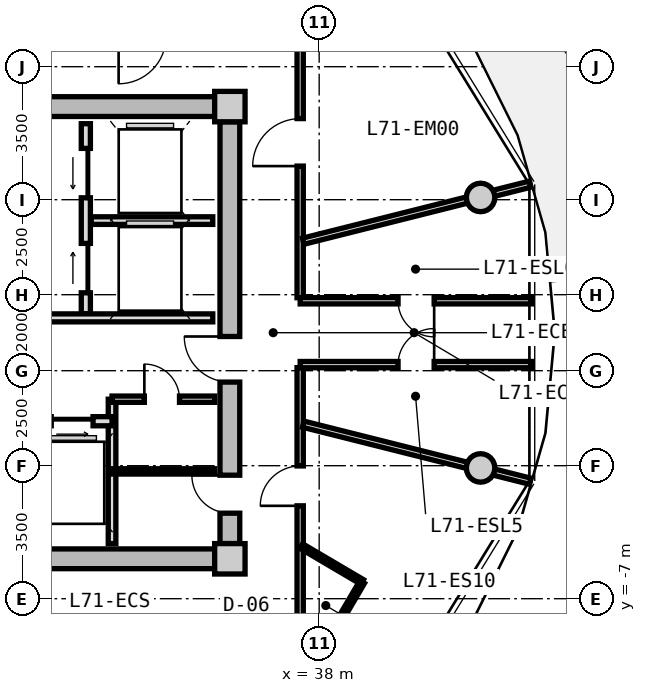
"""IFC4 building model, lengths in metres.
Left out: names, types, materials, properties, quantities, classifications, styles, units other than length and angle.
Written with IfcOpenShell. Run it as: python <this file> out.ifc"""

import sys

from ifc_helpers import new_model, si_unit, direction, frame, frame_2d, origin, origin_2d, place, context, subcontext, project, spatial, rectangle, circle, extrude, source, transform, mapped, element, fill, save


model = new_model("IFC4")
c1 = context("Model", 3, precision=1e-05, world=origin(), true_north=direction((0.0, 1.0)))
c2 = subcontext(c1, "Body", "Model", "MODEL_VIEW")
j1 = project(units=[si_unit("LENGTHUNIT", "METRE"), si_unit("PLANEANGLEUNIT", "RADIAN")], contexts=[c1])
p1 = place(None, origin())
s1 = spatial("IfcSite", under=j1, at=p1, CompositionType="ELEMENT")
p2 = place(p1, origin())
s2 = spatial("IfcBuilding", under=s1, at=p2, CompositionType="ELEMENT")
p3 = place(p2, frame((0.0, 0.0, 229.15)))
s3 = spatial("IfcBuildingStorey", under=s2, at=p3, CompositionType="ELEMENT", Elevation=229.15)
m1 = source(origin(), c2, "Body", "SweptSolid", [
    extrude(rectangle(XDim=0.8, YDim=0.8, at=origin_2d()), origin(), (0.0, 0.0, 1.0), 3.05),
])
for number, where, z_axis, x_axis in (
    (1, (35.65, -5.95, 0.0), (0.0, 0.0, 1.0), (1.0, 0.0, 0.0)),
    (2, (35.65, 5.95, 0.0), (0.0, 0.0, 1.0), (1.0, 0.0, 0.0)),
):
    element("IfcColumn", number, at=place(p3, frame(where, z_axis=z_axis, x_axis=x_axis)), inside=s3, PredefinedType="COLUMN", context=c2, shape_type="MappedRepresentation", body=[
        mapped(m1, transform((0.0, 0.0, 0.0), x_axis=(1.0, 0.0, 0.0), y_axis=(0.0, 1.0, 0.0), z_axis=(0.0, 0.0, 1.0), scale=1.0)),
    ])
m2 = source(origin(), c2, "Body", "SweptSolid", [
    extrude(rectangle(XDim=14.5, YDim=0.52, at=frame_2d((7.25, 0.0))), origin(), (0.0, 0.0, 1.0), 2.81),
])
for number, where, z_axis, x_axis in (
    (3, (20.75, 5.95, 0.0), (0.0, 0.0, 1.0), (1.0, 0.0, 0.0)),
    (4, (35.25, -5.95, 0.0), (0.0, 0.0, 1.0), (-1.0, 0.0, 0.0)),
):
    element("IfcWall", number, at=place(p3, frame(where, z_axis=z_axis, x_axis=x_axis)), inside=s3, PredefinedType="SHEAR", context=c2, shape_type="MappedRepresentation", body=[
        mapped(m2, transform((0.0, 0.0, 0.0), x_axis=(1.0, 0.0, 0.0), y_axis=(0.0, 1.0, 0.0), z_axis=(0.0, 0.0, 1.0), scale=1.0)),
    ])
m3 = source(origin(), c2, "Body", "SweptSolid", [
    extrude(rectangle(XDim=11.1, YDim=0.52, at=frame_2d((5.55, 0.0))), origin(), (0.0, 0.0, 1.0), 2.81),
])
p4 = place(p3, frame((35.65, 5.55, 0.0), z_axis=(0.0, 0.0, 1.0), x_axis=(0.0, -1.0, 0.0)))
e5 = element("IfcWall", 5, at=p4, inside=s3, PredefinedType="SHEAR", context=c2, shape_type="MappedRepresentation", body=[
    mapped(m3, transform((0.0, 0.0, 0.0), x_axis=(1.0, 0.0, 0.0), y_axis=(0.0, 1.0, 0.0), z_axis=(0.0, 0.0, 1.0), scale=1.0)),
])
p5 = place(p4, frame((5.65, 0.0, 0.0)))
e6 = element("IfcOpeningElement", 6, at=p5, cuts=e5, PredefinedType="OPENING", context=c2, shape_type="SweptSolid", body=[
    extrude(rectangle(XDim=1.2, YDim=2.15, at=frame_2d((0.6, 1.075))), frame((0.0, 0.27, 0.0), z_axis=(0.0, -1.0, 0.0), x_axis=(1.0, 0.0, 0.0)), (0.0, 0.0, 1.0), 0.54),
])
p6 = place(p4, frame((9.3, 0.0, 0.0)))
e7 = element("IfcOpeningElement", 7, at=p6, cuts=e5, PredefinedType="OPENING", context=c2, shape_type="SweptSolid", body=[
    extrude(rectangle(XDim=1.0, YDim=2.1, at=frame_2d((0.5, 1.05))), frame((0.0, 0.27, 0.0), z_axis=(0.0, -1.0, 0.0), x_axis=(1.0, 0.0, 0.0)), (0.0, 0.0, 1.0), 0.54),
])
m4 = source(origin(), c2, "Body", "SweptSolid", [
    extrude(circle(Radius=0.375, at=origin_2d()), origin(), (0.0, 0.0, 1.0), 3.05),
])
for number, where, z_axis, x_axis in (
    (8, (42.247, 3.559, 0.0), (0.0, 0.0, 1.0), (1.0, 0.0, 0.0)),
    (9, (42.247, -3.559, 0.0), (0.0, 0.0, 1.0), (1.0, 0.0, 0.0)),
):
    element("IfcColumn", number, at=place(p3, frame(where, z_axis=z_axis, x_axis=x_axis)), inside=s3, PredefinedType="COLUMN", context=c2, shape_type="MappedRepresentation", body=[
        mapped(m4, transform((0.0, 0.0, 0.0), x_axis=(1.0, 0.0, 0.0), y_axis=(0.0, 1.0, 0.0), z_axis=(0.0, 0.0, 1.0), scale=1.0)),
    ])
m5 = source(origin(), c2, "Body", "SweptSolid", [
    extrude(rectangle(XDim=5.0, YDim=0.24, at=frame_2d((2.5, 0.0))), origin(), (0.0, 0.0, 1.0), 2.795),
])
p7 = place(p3, frame((31.86, 0.5, 0.0), z_axis=(0.0, 0.0, 1.0), x_axis=(0.0, 1.0, 0.0)))
e10 = element("IfcWall", 10, at=p7, inside=s3, PredefinedType="PARTITIONING", context=c2, shape_type="MappedRepresentation", body=[
    mapped(m5, transform((0.0, 0.0, 0.0), x_axis=(1.0, 0.0, 0.0), y_axis=(0.0, 1.0, 0.0), z_axis=(0.0, 0.0, 1.0), scale=1.0)),
])
p8 = place(p7, frame((3.05, 0.0, 0.0)))
e11 = element("IfcOpeningElement", 11, at=p8, cuts=e10, PredefinedType="OPENING", context=c2, shape_type="SweptSolid", body=[
    extrude(rectangle(XDim=1.3, YDim=2.2, at=frame_2d((0.65, 1.1))), frame((0.0, 0.13, 0.0), z_axis=(0.0, -1.0, 0.0), x_axis=(1.0, 0.0, 0.0)), (0.0, 0.0, 1.0), 0.26),
])
p9 = place(p7, frame((0.55, 0.0, 0.0)))
e12 = element("IfcOpeningElement", 12, at=p9, cuts=e10, PredefinedType="OPENING", context=c2, shape_type="SweptSolid", body=[
    extrude(rectangle(XDim=1.3, YDim=2.2, at=frame_2d((0.65, 1.1))), frame((0.0, 0.13, 0.0), z_axis=(0.0, -1.0, 0.0), x_axis=(1.0, 0.0, 0.0)), (0.0, 0.0, 1.0), 0.26),
])
m6 = source(origin(), c2, "Body", "SweptSolid", [
    extrude(rectangle(XDim=3.2, YDim=0.2, at=frame_2d((1.6, 0.0))), origin(), (0.0, 0.0, 1.0), 2.795),
])
p10 = place(p3, frame((32.0, 2.95, 0.0), z_axis=(0.0, 0.0, 1.0), x_axis=(1.0, 0.0, 0.0)))
e13 = element("IfcWall", 13, at=p10, inside=s3, PredefinedType="PARTITIONING", context=c2, shape_type="MappedRepresentation", body=[
    mapped(m6, transform((0.0, 0.0, 0.0), x_axis=(1.0, 0.0, 0.0), y_axis=(0.0, 1.0, 0.0), z_axis=(0.0, 0.0, 1.0), scale=1.0)),
])
m7 = source(origin(), c2, "Body", "SweptSolid", [
    extrude(rectangle(XDim=6.66, YDim=0.21, at=frame_2d((3.33, 0.0))), origin(), (0.0, 0.0, 1.0), 2.795),
])
p11 = place(p3, frame((28.54, 0.39, 0.0), z_axis=(0.0, 0.0, 1.0), x_axis=(1.0, 0.0, 0.0)))
e14 = element("IfcWall", 14, at=p11, inside=s3, PredefinedType="PARTITIONING", context=c2, shape_type="MappedRepresentation", body=[
    mapped(m7, transform((0.0, 0.0, 0.0), x_axis=(1.0, 0.0, 0.0), y_axis=(0.0, 1.0, 0.0), z_axis=(0.0, 0.0, 1.0), scale=1.0)),
])
p12 = place(p11, frame((1.0, 0.0, 0.0)))
e15 = element("IfcOpeningElement", 15, at=p12, cuts=e14, PredefinedType="OPENING", context=c2, shape_type="SweptSolid", body=[
    extrude(rectangle(XDim=1.2, YDim=2.15, at=frame_2d((0.6, 1.075))), frame((0.0, 0.115, 0.0), z_axis=(0.0, -1.0, 0.0), x_axis=(1.0, 0.0, 0.0)), (0.0, 0.0, 1.0), 0.23),
])
m8 = source(origin(), c2, "Body", "SweptSolid", [
    extrude(rectangle(XDim=3.8, YDim=0.2, at=frame_2d((1.9, 0.0))), origin(), (0.0, 0.0, 1.0), 2.795),
])
p13 = place(p3, frame((32.55, -5.55, 0.0), z_axis=(0.0, 0.0, 1.0), x_axis=(0.0, 1.0, 0.0)))
e16 = element("IfcWall", 16, at=p13, inside=s3, PredefinedType="PARTITIONING", context=c2, shape_type="MappedRepresentation", body=[
    mapped(m8, transform((0.0, 0.0, 0.0), x_axis=(1.0, 0.0, 0.0), y_axis=(0.0, 1.0, 0.0), z_axis=(0.0, 0.0, 1.0), scale=1.0)),
])
m9 = source(origin(), c2, "Body", "SweptSolid", [
    extrude(rectangle(XDim=2.05, YDim=0.24, at=frame_2d((1.025, 0.0))), origin(), (0.0, 0.0, 1.0), 2.795),
])
p14 = place(p3, frame((30.5, -2.33, 0.0), z_axis=(0.0, 0.0, 1.0), x_axis=(1.0, 0.0, 0.0)))
e17 = element("IfcWall", 17, at=p14, inside=s3, PredefinedType="PARTITIONING", context=c2, shape_type="MappedRepresentation", body=[
    mapped(m9, transform((0.0, 0.0, 0.0), x_axis=(1.0, 0.0, 0.0), y_axis=(0.0, 1.0, 0.0), z_axis=(0.0, 0.0, 1.0), scale=1.0)),
])
p15 = place(p14, frame((0.45, 0.0, 0.0)))
e18 = element("IfcOpeningElement", 18, at=p15, cuts=e17, PredefinedType="OPENING", context=c2, shape_type="SweptSolid", body=[
    extrude(rectangle(XDim=1.1, YDim=2.2, at=frame_2d((0.55, 1.1))), frame((0.0, 0.13, 0.0), z_axis=(0.0, -1.0, 0.0), x_axis=(1.0, 0.0, 0.0)), (0.0, 0.0, 1.0), 0.26),
])
m10 = source(origin(), c2, "Body", "SweptSolid", [
    extrude(rectangle(XDim=2.7, YDim=0.165, at=frame_2d((1.35, 0.0))), origin(), (0.0, 0.0, 1.0), 2.795),
])
p16 = place(p3, frame((32.55, -1.75, 0.0), z_axis=(0.0, 0.0, 1.0), x_axis=(1.0, 0.0, 0.0)))
e19 = element("IfcWall", 19, at=p16, inside=s3, PredefinedType="PARTITIONING", context=c2, shape_type="MappedRepresentation", body=[
    mapped(m10, transform((0.0, 0.0, 0.0), x_axis=(1.0, 0.0, 0.0), y_axis=(0.0, 1.0, 0.0), z_axis=(0.0, 0.0, 1.0), scale=1.0)),
])
p17 = place(p16, frame((0.85, 0.0, 0.0)))
e20 = element("IfcOpeningElement", 20, at=p17, cuts=e19, PredefinedType="OPENING", context=c2, shape_type="SweptSolid", body=[
    extrude(rectangle(XDim=0.925, YDim=2.1, at=frame_2d((0.462, 1.05))), frame((0.0, 0.093, 0.0), z_axis=(0.0, -1.0, 0.0), x_axis=(1.0, 0.0, 0.0)), (0.0, 0.0, 1.0), 0.185),
])
m11 = source(origin(), c2, "Body", "SweptSolid", [
    extrude(rectangle(XDim=2.7, YDim=0.14, at=frame_2d((1.35, 0.0))), origin(), (0.0, 0.0, 1.0), 2.795),
])
p18 = place(p3, frame((32.55, -3.65, 0.0), z_axis=(0.0, 0.0, 1.0), x_axis=(1.0, 0.0, 0.0)))
e21 = element("IfcWall", 21, at=p18, inside=s3, PredefinedType="PARTITIONING", context=c2, shape_type="MappedRepresentation", body=[
    mapped(m11, transform((0.0, 0.0, 0.0), x_axis=(1.0, 0.0, 0.0), y_axis=(0.0, 1.0, 0.0), z_axis=(0.0, 0.0, 1.0), scale=1.0)),
])
m12 = source(origin(), c2, "Body", "SweptSolid", [
    extrude(rectangle(XDim=6.88, YDim=0.165, at=frame_2d((3.44, 0.0))), origin(), (0.0, 0.0, 1.0), 2.795),
])
p19 = place(p3, frame((37.5, 7.8, 0.0), z_axis=(0.0, 0.0, 1.0), x_axis=(0.0, -1.0, 0.0)))
e22 = element("IfcWall", 22, at=p19, inside=s3, PredefinedType="PARTITIONING", context=c2, shape_type="MappedRepresentation", body=[
    mapped(m12, transform((0.0, 0.0, 0.0), x_axis=(1.0, 0.0, 0.0), y_axis=(0.0, 1.0, 0.0), z_axis=(0.0, 0.0, 1.0), scale=1.0)),
])
p20 = place(p19, frame((2.166, 0.0, 0.0)))
e23 = element("IfcOpeningElement", 23, at=p20, cuts=e22, PredefinedType="OPENING", context=c2, shape_type="SweptSolid", body=[
    extrude(rectangle(XDim=1.25, YDim=2.2, at=frame_2d((0.625, 1.1))), frame((0.0, 0.093, 0.0), z_axis=(0.0, -1.0, 0.0), x_axis=(1.0, 0.0, 0.0)), (0.0, 0.0, 1.0), 0.185),
])
p21 = place(p3, frame((37.5, -0.92, 0.0), z_axis=(0.0, 0.0, 1.0), x_axis=(0.0, -1.0, 0.0)))
e24 = element("IfcWall", 24, at=p21, inside=s3, PredefinedType="PARTITIONING", context=c2, shape_type="MappedRepresentation", body=[
    mapped(m12, transform((0.0, 0.0, 0.0), x_axis=(1.0, 0.0, 0.0), y_axis=(0.0, 1.0, 0.0), z_axis=(0.0, 0.0, 1.0), scale=1.0)),
])
p22 = place(p21, frame((2.586, 0.0, 0.0)))
e25 = element("IfcOpeningElement", 25, at=p22, cuts=e24, PredefinedType="OPENING", context=c2, shape_type="SweptSolid", body=[
    extrude(rectangle(XDim=1.05, YDim=2.15, at=frame_2d((0.525, 1.075))), frame((0.0, 0.093, 0.0), z_axis=(0.0, -1.0, 0.0), x_axis=(1.0, 0.0, 0.0)), (0.0, 0.0, 1.0), 0.185),
])
m13 = source(origin(), c2, "Body", "SweptSolid", [
    extrude(rectangle(XDim=6.157, YDim=0.165, at=frame_2d((3.079, 0.0))), origin(), (0.0, 0.0, 1.0), 2.395),
])
for number, where, z_axis, x_axis in (
    (26, (37.58, -2.407, 0.0), (0.0, 0.0, 1.0), (0.97, -0.244, 0.0)),
    (27, (37.58, 2.407, 0.0), (0.0, 0.0, 1.0), (0.97, 0.244, 0.0)),
):
    element("IfcWall", number, at=place(p3, frame(where, z_axis=z_axis, x_axis=x_axis)), inside=s3, PredefinedType="PARTITIONING", context=c2, shape_type="MappedRepresentation", body=[
        mapped(m13, transform((0.0, 0.0, 0.0), x_axis=(1.0, 0.0, 0.0), y_axis=(0.0, 1.0, 0.0), z_axis=(0.0, 0.0, 1.0), scale=1.0)),
    ])
m14 = source(origin(), c2, "Body", "SweptSolid", [
    extrude(rectangle(XDim=6.101, YDim=0.165, at=frame_2d((3.051, 0.0))), origin(), (0.0, 0.0, 1.0), 2.795),
])
p23 = place(p3, frame((37.5, 0.84, 0.0), z_axis=(0.0, 0.0, 1.0), x_axis=(1.0, 0.0, 0.0)))
e28 = element("IfcWall", 28, at=p23, inside=s3, PredefinedType="PARTITIONING", context=c2, shape_type="MappedRepresentation", body=[
    mapped(m14, transform((0.0, 0.0, 0.0), x_axis=(1.0, 0.0, 0.0), y_axis=(0.0, 1.0, 0.0), z_axis=(0.0, 0.0, 1.0), scale=1.0)),
])
p24 = place(p23, frame((2.576, 0.0, 0.0)))
e29 = element("IfcOpeningElement", 29, at=p24, cuts=e28, PredefinedType="OPENING", context=c2, shape_type="SweptSolid", body=[
    extrude(rectangle(XDim=0.95, YDim=2.1, at=frame_2d((0.475, 1.05))), frame((0.0, 0.093, 0.0), z_axis=(0.0, -1.0, 0.0), x_axis=(1.0, 0.0, 0.0)), (0.0, 0.0, 1.0), 0.185),
])
p25 = place(p3, frame((43.601, -0.84, 0.0), z_axis=(0.0, 0.0, 1.0), x_axis=(-1.0, 0.0, 0.0)))
e30 = element("IfcWall", 30, at=p25, inside=s3, PredefinedType="PARTITIONING", context=c2, shape_type="MappedRepresentation", body=[
    mapped(m14, transform((0.0, 0.0, 0.0), x_axis=(1.0, 0.0, 0.0), y_axis=(0.0, 1.0, 0.0), z_axis=(0.0, 0.0, 1.0), scale=1.0)),
])
p26 = place(p25, frame((2.576, 0.0, 0.0)))
e31 = element("IfcOpeningElement", 31, at=p26, cuts=e30, PredefinedType="OPENING", context=c2, shape_type="SweptSolid", body=[
    extrude(rectangle(XDim=0.95, YDim=2.1, at=frame_2d((0.475, 1.05))), frame((0.0, 0.093, 0.0), z_axis=(0.0, -1.0, 0.0), x_axis=(1.0, 0.0, 0.0)), (0.0, 0.0, 1.0), 0.185),
])
m15 = source(origin(), c2, "Body", "SweptSolid", [
    extrude(rectangle(XDim=1.859, YDim=0.14, at=frame_2d((0.93, 0.0))), origin(), (0.0, 0.0, 1.0), 2.795),
])
p27 = place(p3, frame((37.53, -5.615, 0.0), z_axis=(0.0, 0.0, 1.0), x_axis=(0.861555897139, -0.507662718845, 0.0)))
e32 = element("IfcWall", 32, at=p27, inside=s3, PredefinedType="PARTITIONING", context=c2, shape_type="MappedRepresentation", body=[
    mapped(m15, transform((0.0, 0.0, 0.0), x_axis=(1.0, 0.0, 0.0), y_axis=(0.0, 1.0, 0.0), z_axis=(0.0, 0.0, 1.0), scale=1.0)),
])
m16 = source(origin(), c2, "Body", "SweptSolid", [
    extrude(rectangle(XDim=2.939, YDim=0.14, at=frame_2d((1.47, 0.0))), origin(), (0.0, 0.0, 1.0), 2.795),
])
p28 = place(p3, frame((39.132, -6.559, 0.0), z_axis=(0.0, 0.0, 1.0), x_axis=(-0.505883614636, -0.862601743821, 0.0)))
e33 = element("IfcWall", 33, at=p28, inside=s3, PredefinedType="PARTITIONING", context=c2, shape_type="MappedRepresentation", body=[
    mapped(m16, transform((0.0, 0.0, 0.0), x_axis=(1.0, 0.0, 0.0), y_axis=(0.0, 1.0, 0.0), z_axis=(0.0, 0.0, 1.0), scale=1.0)),
])
p29 = place(p28, frame((1.01, 0.0, 0.0)))
e34 = element("IfcOpeningElement", 34, at=p29, cuts=e33, PredefinedType="OPENING", context=c2, shape_type="SweptSolid", body=[
    extrude(rectangle(XDim=0.92, YDim=2.1, at=frame_2d((0.46, 1.05))), frame((0.0, 0.08, 0.0), z_axis=(0.0, -1.0, 0.0), x_axis=(1.0, 0.0, 0.0)), (0.0, 0.0, 1.0), 0.16),
])
m17 = source(origin(), c2, "Body", "SweptSolid", [
    extrude(rectangle(XDim=1.3, YDim=2.2, at=frame_2d((0.65, 1.1))), frame((0.0, 0.025, 0.0), z_axis=(0.0, -1.0, 0.0), x_axis=(1.0, 0.0, 0.0)), (0.0, 0.0, 1.0), 0.05),
])
p30 = place(p8, origin())
e35 = element("IfcDoor", 35, at=p30, inside=s3, OperationType="SLIDING_TO_LEFT", PredefinedType="DOOR", context=c2, shape_type="MappedRepresentation", body=[
    mapped(m17, transform((0.0, 0.0, 0.0), x_axis=(1.0, 0.0, 0.0), y_axis=(0.0, 1.0, 0.0), z_axis=(0.0, 0.0, 1.0), scale=1.0)),
])
fill(e11, e35)
p31 = place(p9, origin())
e36 = element("IfcDoor", 36, at=p31, inside=s3, OperationType="SLIDING_TO_RIGHT", PredefinedType="DOOR", context=c2, shape_type="MappedRepresentation", body=[
    mapped(m17, transform((0.0, 0.0, 0.0), x_axis=(1.0, 0.0, 0.0), y_axis=(0.0, 1.0, 0.0), z_axis=(0.0, 0.0, 1.0), scale=1.0)),
])
fill(e12, e36)
m18 = source(origin(), c2, "Body", "SweptSolid", [
    extrude(rectangle(XDim=1.2, YDim=2.15, at=frame_2d((0.6, 1.075))), frame((0.0, 0.025, 0.0), z_axis=(0.0, -1.0, 0.0), x_axis=(1.0, 0.0, 0.0)), (0.0, 0.0, 1.0), 0.05),
])
p32 = place(p5, frame((1.2, 0.0, 0.0), z_axis=(0.0, 0.0, 1.0), x_axis=(-1.0, 0.0, 0.0)))
e37 = element("IfcDoor", 37, at=p32, inside=s3, OperationType="SINGLE_SWING_RIGHT", PredefinedType="DOOR", context=c2, shape_type="MappedRepresentation", body=[
    mapped(m18, transform((0.0, 0.0, 0.0), x_axis=(1.0, 0.0, 0.0), y_axis=(0.0, 1.0, 0.0), z_axis=(0.0, 0.0, 1.0), scale=1.0)),
])
fill(e6, e37)
m19 = source(origin(), c2, "Body", "SweptSolid", [
    extrude(rectangle(XDim=1.1, YDim=2.2, at=frame_2d((0.55, 1.1))), frame((0.0, 0.025, 0.0), z_axis=(0.0, -1.0, 0.0), x_axis=(1.0, 0.0, 0.0)), (0.0, 0.0, 1.0), 0.05),
])
p33 = place(p15, frame((1.1, 0.0, 0.0), z_axis=(0.0, 0.0, 1.0), x_axis=(-1.0, 0.0, 0.0)))
e38 = element("IfcDoor", 38, at=p33, inside=s3, OperationType="SLIDING_TO_RIGHT", PredefinedType="DOOR", context=c2, shape_type="MappedRepresentation", body=[
    mapped(m19, transform((0.0, 0.0, 0.0), x_axis=(1.0, 0.0, 0.0), y_axis=(0.0, 1.0, 0.0), z_axis=(0.0, 0.0, 1.0), scale=1.0)),
])
fill(e18, e38)
m20 = source(origin(), c2, "Body", "SweptSolid", [
    extrude(rectangle(XDim=0.925, YDim=2.1, at=frame_2d((0.462, 1.05))), frame((0.0, 0.025, 0.0), z_axis=(0.0, -1.0, 0.0), x_axis=(1.0, 0.0, 0.0)), (0.0, 0.0, 1.0), 0.05),
])
p34 = place(p17, origin())
e39 = element("IfcDoor", 39, at=p34, inside=s3, OperationType="SINGLE_SWING_LEFT", PredefinedType="DOOR", context=c2, shape_type="MappedRepresentation", body=[
    mapped(m20, transform((0.0, 0.0, 0.0), x_axis=(1.0, 0.0, 0.0), y_axis=(0.0, 1.0, 0.0), z_axis=(0.0, 0.0, 1.0), scale=1.0)),
])
fill(e20, e39)
m21 = source(origin(), c2, "Body", "SweptSolid", [
    extrude(rectangle(XDim=1.0, YDim=2.1, at=frame_2d((0.5, 1.05))), frame((0.0, 0.025, 0.0), z_axis=(0.0, -1.0, 0.0), x_axis=(1.0, 0.0, 0.0)), (0.0, 0.0, 1.0), 0.05),
])
p35 = place(p6, frame((1.0, 0.0, 0.0), z_axis=(0.0, 0.0, 1.0), x_axis=(-1.0, 0.0, 0.0)))
e40 = element("IfcDoor", 40, at=p35, inside=s3, OperationType="SINGLE_SWING_RIGHT", PredefinedType="DOOR", context=c2, shape_type="MappedRepresentation", body=[
    mapped(m21, transform((0.0, 0.0, 0.0), x_axis=(1.0, 0.0, 0.0), y_axis=(0.0, 1.0, 0.0), z_axis=(0.0, 0.0, 1.0), scale=1.0)),
])
fill(e7, e40)
m22 = source(origin(), c2, "Body", "SweptSolid", [
    extrude(rectangle(XDim=0.95, YDim=2.1, at=frame_2d((0.475, 1.05))), frame((0.0, 0.025, 0.0), z_axis=(0.0, -1.0, 0.0), x_axis=(1.0, 0.0, 0.0)), (0.0, 0.0, 1.0), 0.05),
])
p36 = place(p26, frame((0.95, 0.0, 0.0), z_axis=(0.0, 0.0, 1.0), x_axis=(-1.0, 0.0, 0.0)))
e41 = element("IfcDoor", 41, at=p36, inside=s3, OperationType="SINGLE_SWING_RIGHT", PredefinedType="DOOR", context=c2, shape_type="MappedRepresentation", body=[
    mapped(m22, transform((0.0, 0.0, 0.0), x_axis=(1.0, 0.0, 0.0), y_axis=(0.0, 1.0, 0.0), z_axis=(0.0, 0.0, 1.0), scale=1.0)),
])
fill(e31, e41)
p37 = place(p24, frame((0.95, 0.0, 0.0), z_axis=(0.0, 0.0, 1.0), x_axis=(-1.0, 0.0, 0.0)))
e42 = element("IfcDoor", 42, at=p37, inside=s3, OperationType="SINGLE_SWING_LEFT", PredefinedType="DOOR", context=c2, shape_type="MappedRepresentation", body=[
    mapped(m22, transform((0.0, 0.0, 0.0), x_axis=(1.0, 0.0, 0.0), y_axis=(0.0, 1.0, 0.0), z_axis=(0.0, 0.0, 1.0), scale=1.0)),
])
fill(e29, e42)
m23 = source(origin(), c2, "Body", "SweptSolid", [
    extrude(rectangle(XDim=1.25, YDim=2.2, at=frame_2d((0.625, 1.1))), frame((0.0, 0.025, 0.0), z_axis=(0.0, -1.0, 0.0), x_axis=(1.0, 0.0, 0.0)), (0.0, 0.0, 1.0), 0.05),
])
p38 = place(p20, frame((1.25, 0.0, 0.0), z_axis=(0.0, 0.0, 1.0), x_axis=(-1.0, 0.0, 0.0)))
e43 = element("IfcDoor", 43, at=p38, inside=s3, OperationType="SINGLE_SWING_LEFT", PredefinedType="DOOR", context=c2, shape_type="MappedRepresentation", body=[
    mapped(m23, transform((0.0, 0.0, 0.0), x_axis=(1.0, 0.0, 0.0), y_axis=(0.0, 1.0, 0.0), z_axis=(0.0, 0.0, 1.0), scale=1.0)),
])
fill(e23, e43)
m24 = source(origin(), c2, "Body", "SweptSolid", [
    extrude(rectangle(XDim=1.05, YDim=2.15, at=frame_2d((0.525, 1.075))), frame((0.0, 0.025, 0.0), z_axis=(0.0, -1.0, 0.0), x_axis=(1.0, 0.0, 0.0)), (0.0, 0.0, 1.0), 0.05),
])
p39 = place(p22, frame((1.05, 0.0, 0.0), z_axis=(0.0, 0.0, 1.0), x_axis=(-1.0, 0.0, 0.0)))
e44 = element("IfcDoor", 44, at=p39, inside=s3, OperationType="SINGLE_SWING_LEFT", PredefinedType="DOOR", context=c2, shape_type="MappedRepresentation", body=[
    mapped(m24, transform((0.0, 0.0, 0.0), x_axis=(1.0, 0.0, 0.0), y_axis=(0.0, 1.0, 0.0), z_axis=(0.0, 0.0, 1.0), scale=1.0)),
])
fill(e25, e44)
save(model, sys.argv[1])
